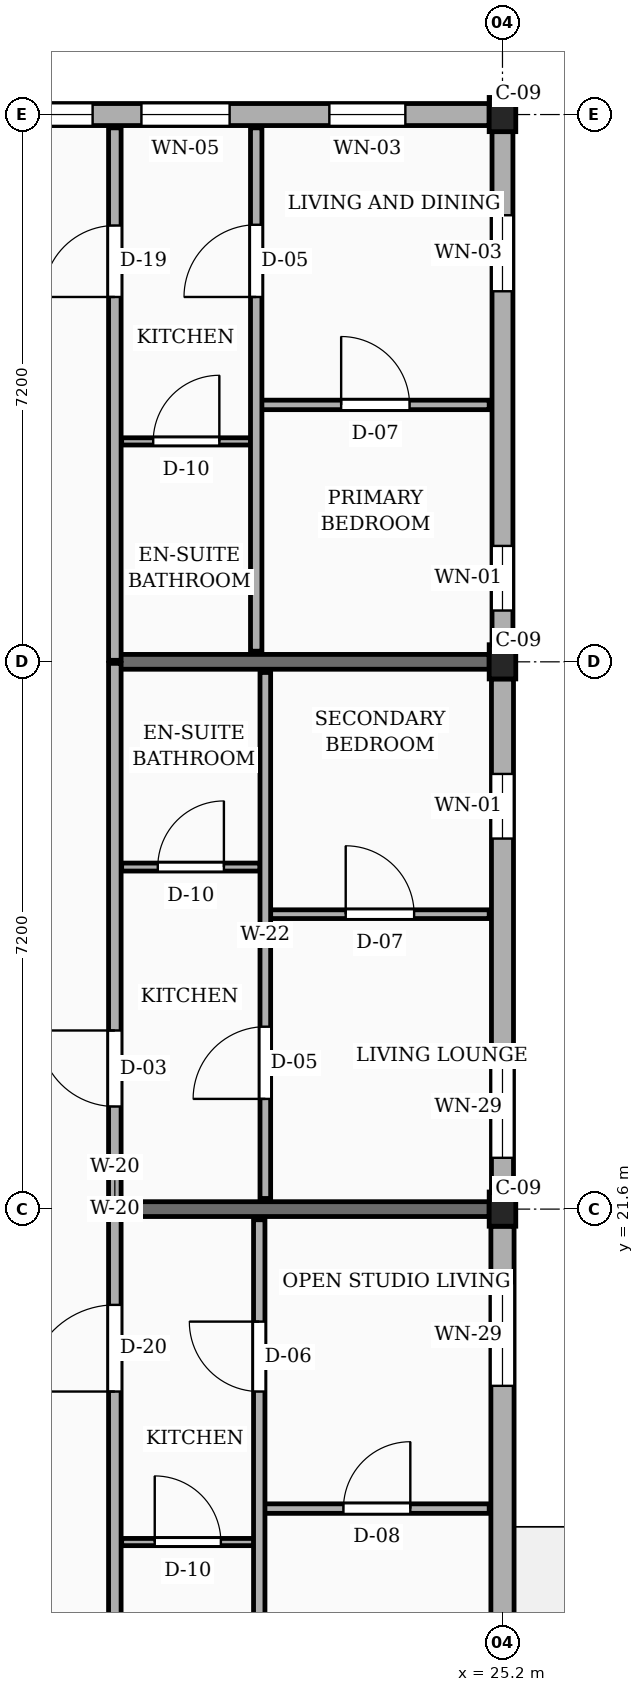
"""IFC4 building model, lengths in metres.
Left out: names, types, materials, properties, quantities, classifications, styles, units other than length and angle.
Written with IfcOpenShell. Run it as: python <this file> out.ifc"""

import sys

from ifc_helpers import new_model, si_unit, direction, frame, frame_2d, origin, origin_2d, place, context, subcontext, project, spatial, rectangle, extrude, element, fill, save


model = new_model("IFC4")
c1 = context("Model", 3, precision=1e-05, world=origin(), true_north=direction((0.0, 1.0)))
c2 = subcontext(c1, "Body", "Model", "MODEL_VIEW")
j1 = project(units=[si_unit("LENGTHUNIT", "METRE"), si_unit("PLANEANGLEUNIT", "RADIAN")], contexts=[c1])
p1 = place(None, origin())
s1 = spatial("IfcSite", under=j1, at=p1, CompositionType="ELEMENT")
p2 = place(p1, origin())
s2 = spatial("IfcBuilding", under=s1, at=p2, CompositionType="ELEMENT")
p3 = place(p2, frame((0.0, 0.0, 48.6)))
s3 = spatial("IfcBuildingStorey", under=s2, at=p3, CompositionType="ELEMENT", Elevation=48.6)
for number, where, z_axis, x_axis in (
    (1, (25.2, 21.6, 0.0), (0.0, 0.0, 1.0), (1.0, 0.0, 0.0)),
    (2, (25.2, 28.8, 0.0), (0.0, 0.0, 1.0), (1.0, 0.0, 0.0)),
    (3, (25.2, 36.0, 0.0), (0.0, 0.0, 1.0), (1.0, 0.0, 0.0)),
):
    element("IfcColumn", number, at=place(p3, frame(where, z_axis=z_axis, x_axis=x_axis)), inside=s3, PredefinedType="COLUMN", context=c2, shape_type="SweptSolid", body=[
        extrude(rectangle(XDim=0.35, YDim=0.45, at=origin_2d()), origin(), (0.0, 0.0, 1.0), 3.15),
    ])
for number, where, z_axis, x_axis in (
    (4, (20.1, 21.6, 0.0), (0.0, 0.0, 1.0), (1.0, 0.0, 0.0)),
    (5, (20.1, 28.8, 0.0), (0.0, 0.0, 1.0), (1.0, 0.0, 0.0)),
):
    element("IfcWall", number, at=place(p3, frame(where, z_axis=z_axis, x_axis=x_axis)), inside=s3, PredefinedType="SOLIDWALL", context=c2, shape_type="SweptSolid", body=[
        extrude(rectangle(XDim=4.925, YDim=0.195, at=frame_2d((2.462, 0.0))), origin(), (0.0, 0.0, 1.0), 2.22),
    ])
p4 = place(p3, frame((25.2, 14.625, 0.0), z_axis=(0.0, 0.0, 1.0), x_axis=(0.0, 1.0, 0.0)))
e6 = element("IfcWall", 6, at=p4, inside=s3, PredefinedType="SOLIDWALL", context=c2, shape_type="SweptSolid", body=[
    extrude(rectangle(XDim=6.75, YDim=0.305, at=frame_2d((3.375, 0.0))), origin(), (0.0, 0.0, 1.0), 2.46),
])
p5 = place(p4, frame((0.45, 0.0, 0.78)))
e7 = element("IfcOpeningElement", 7, at=p5, cuts=e6, PredefinedType="OPENING", context=c2, shape_type="SweptSolid", body=[
    extrude(rectangle(XDim=1.15, YDim=1.44, at=frame_2d((0.575, 0.72))), frame((0.0, 0.163, 0.0), z_axis=(0.0, -1.0, 0.0), x_axis=(1.0, 0.0, 0.0)), (0.0, 0.0, 1.0), 0.325),
])
p6 = place(p4, frame((4.65, 0.0, 0.78)))
e8 = element("IfcOpeningElement", 8, at=p6, cuts=e6, PredefinedType="OPENING", context=c2, shape_type="SweptSolid", body=[
    extrude(rectangle(XDim=1.35, YDim=1.44, at=frame_2d((0.675, 0.72))), frame((0.0, 0.163, 0.0), z_axis=(0.0, -1.0, 0.0), x_axis=(1.0, 0.0, 0.0)), (0.0, 0.0, 1.0), 0.325),
])
p7 = place(p3, frame((25.2, 21.825, 0.0), z_axis=(0.0, 0.0, 1.0), x_axis=(0.0, 1.0, 0.0)))
e9 = element("IfcWall", 9, at=p7, inside=s3, PredefinedType="SOLIDWALL", context=c2, shape_type="SweptSolid", body=[
    extrude(rectangle(XDim=6.75, YDim=0.29, at=frame_2d((3.375, 0.0))), origin(), (0.0, 0.0, 1.0), 2.46),
])
p8 = place(p7, frame((0.45, 0.0, 0.78)))
e10 = element("IfcOpeningElement", 10, at=p8, cuts=e9, PredefinedType="OPENING", context=c2, shape_type="SweptSolid", body=[
    extrude(rectangle(XDim=1.35, YDim=1.44, at=frame_2d((0.675, 0.72))), frame((0.0, 0.155, 0.0), z_axis=(0.0, -1.0, 0.0), x_axis=(1.0, 0.0, 0.0)), (0.0, 0.0, 1.0), 0.31),
])
p9 = place(p7, frame((4.65, 0.0, 0.78)))
e11 = element("IfcOpeningElement", 11, at=p9, cuts=e9, PredefinedType="OPENING", context=c2, shape_type="SweptSolid", body=[
    extrude(rectangle(XDim=0.85, YDim=1.15, at=frame_2d((0.425, 0.575))), frame((0.0, 0.155, 0.0), z_axis=(0.0, -1.0, 0.0), x_axis=(1.0, 0.0, 0.0)), (0.0, 0.0, 1.0), 0.31),
])
p10 = place(p3, frame((25.2, 29.025, 0.0), z_axis=(0.0, 0.0, 1.0), x_axis=(0.0, 1.0, 0.0)))
e12 = element("IfcWall", 12, at=p10, inside=s3, PredefinedType="SOLIDWALL", context=c2, shape_type="SweptSolid", body=[
    extrude(rectangle(XDim=6.75, YDim=0.275, at=frame_2d((3.375, 0.0))), origin(), (0.0, 0.0, 1.0), 2.46),
])
p11 = place(p10, frame((0.45, 0.0, 0.78)))
e13 = element("IfcOpeningElement", 13, at=p11, cuts=e12, PredefinedType="OPENING", context=c2, shape_type="SweptSolid", body=[
    extrude(rectangle(XDim=0.85, YDim=1.15, at=frame_2d((0.425, 0.575))), frame((0.0, 0.147, 0.0), z_axis=(0.0, -1.0, 0.0), x_axis=(1.0, 0.0, 0.0)), (0.0, 0.0, 1.0), 0.295),
])
p12 = place(p10, frame((4.65, 0.0, 0.78)))
e14 = element("IfcOpeningElement", 14, at=p12, cuts=e12, PredefinedType="OPENING", context=c2, shape_type="SweptSolid", body=[
    extrude(rectangle(XDim=1.0, YDim=1.15, at=frame_2d((0.5, 0.575))), frame((0.0, 0.147, 0.0), z_axis=(0.0, -1.0, 0.0), x_axis=(1.0, 0.0, 0.0)), (0.0, 0.0, 1.0), 0.295),
])
p13 = place(p3, frame((25.025, 36.0, 0.0), z_axis=(0.0, 0.0, 1.0), x_axis=(-1.0, 0.0, 0.0)))
e15 = element("IfcWall", 15, at=p13, inside=s3, PredefinedType="SOLIDWALL", context=c2, shape_type="SweptSolid", body=[
    extrude(rectangle(XDim=6.85, YDim=0.29, at=frame_2d((3.425, 0.0))), origin(), (0.0, 0.0, 1.0), 2.46),
])
p14 = place(p13, frame((1.103, 0.0, 0.78)))
e16 = element("IfcOpeningElement", 16, at=p14, cuts=e15, PredefinedType="OPENING", context=c2, shape_type="SweptSolid", body=[
    extrude(rectangle(XDim=1.0, YDim=1.15, at=frame_2d((0.5, 0.575))), frame((0.0, 0.155, 0.0), z_axis=(0.0, -1.0, 0.0), x_axis=(1.0, 0.0, 0.0)), (0.0, 0.0, 1.0), 0.31),
])
p15 = place(p13, frame((3.415, 0.0, 0.78)))
e17 = element("IfcOpeningElement", 17, at=p15, cuts=e15, PredefinedType="OPENING", context=c2, shape_type="SweptSolid", body=[
    extrude(rectangle(XDim=1.16, YDim=1.15, at=frame_2d((0.58, 0.575))), frame((0.0, 0.155, 0.0), z_axis=(0.0, -1.0, 0.0), x_axis=(1.0, 0.0, 0.0)), (0.0, 0.0, 1.0), 0.31),
])
p16 = place(p13, frame((5.218, 0.0, 0.78)))
e18 = element("IfcOpeningElement", 18, at=p16, cuts=e15, PredefinedType="OPENING", context=c2, shape_type="SweptSolid", body=[
    extrude(rectangle(XDim=1.2, YDim=1.26, at=frame_2d((0.6, 0.63))), frame((0.0, 0.155, 0.0), z_axis=(0.0, -1.0, 0.0), x_axis=(1.0, 0.0, 0.0)), (0.0, 0.0, 1.0), 0.31),
])
p17 = place(p3, frame((20.1, 14.42, 0.0), z_axis=(0.0, 0.0, 1.0), x_axis=(0.0, 1.0, 0.0)))
e19 = element("IfcWall", 19, at=p17, inside=s3, PredefinedType="PARTITIONING", context=c2, shape_type="SweptSolid", body=[
    extrude(rectangle(XDim=7.16, YDim=0.165, at=frame_2d((3.58, 0.0))), origin(), (0.0, 0.0, 1.0), 2.325),
])
p18 = place(p17, frame((4.78, 0.0, 0.0)))
e20 = element("IfcOpeningElement", 20, at=p18, cuts=e19, PredefinedType="OPENING", context=c2, shape_type="SweptSolid", body=[
    extrude(rectangle(XDim=1.14, YDim=2.18, at=frame_2d((0.57, 1.09))), frame((0.0, 0.093, 0.0), z_axis=(0.0, -1.0, 0.0), x_axis=(1.0, 0.0, 0.0)), (0.0, 0.0, 1.0), 0.185),
])
p19 = place(p3, frame((20.1, 21.62, 0.0), z_axis=(0.0, 0.0, 1.0), x_axis=(0.0, 1.0, 0.0)))
e21 = element("IfcWall", 21, at=p19, inside=s3, PredefinedType="PARTITIONING", context=c2, shape_type="SweptSolid", body=[
    extrude(rectangle(XDim=7.16, YDim=0.165, at=frame_2d((3.58, 0.0))), origin(), (0.0, 0.0, 1.0), 2.325),
])
p20 = place(p19, frame((1.33, 0.0, 0.0)))
e22 = element("IfcOpeningElement", 22, at=p20, cuts=e21, PredefinedType="OPENING", context=c2, shape_type="SweptSolid", body=[
    extrude(rectangle(XDim=1.0, YDim=2.15, at=frame_2d((0.5, 1.075))), frame((0.0, 0.093, 0.0), z_axis=(0.0, -1.0, 0.0), x_axis=(1.0, 0.0, 0.0)), (0.0, 0.0, 1.0), 0.185),
])
p21 = place(p3, frame((20.1, 28.82, 0.0), z_axis=(0.0, 0.0, 1.0), x_axis=(0.0, 1.0, 0.0)))
e23 = element("IfcWall", 23, at=p21, inside=s3, PredefinedType="PARTITIONING", context=c2, shape_type="SweptSolid", body=[
    extrude(rectangle(XDim=7.005, YDim=0.165, at=frame_2d((3.502, 0.0))), origin(), (0.0, 0.0, 1.0), 2.325),
])
p22 = place(p21, frame((4.78, 0.0, 0.0)))
e24 = element("IfcOpeningElement", 24, at=p22, cuts=e23, PredefinedType="OPENING", context=c2, shape_type="SweptSolid", body=[
    extrude(rectangle(XDim=0.94, YDim=2.12, at=frame_2d((0.47, 1.06))), frame((0.0, 0.093, 0.0), z_axis=(0.0, -1.0, 0.0), x_axis=(1.0, 0.0, 0.0)), (0.0, 0.0, 1.0), 0.185),
])
p23 = place(p3, frame((22.07, 17.66, 0.0), z_axis=(0.0, 0.0, 1.0), x_axis=(1.0, 0.0, 0.0)))
e25 = element("IfcWall", 25, at=p23, inside=s3, PredefinedType="PARTITIONING", context=c2, shape_type="SweptSolid", body=[
    extrude(rectangle(XDim=2.955, YDim=0.125, at=frame_2d((1.478, 0.0))), origin(), (0.0, 0.0, 1.0), 2.325),
])
p24 = place(p23, frame((1.038, 0.0, 0.0)))
e26 = element("IfcOpeningElement", 26, at=p24, cuts=e25, PredefinedType="OPENING", context=c2, shape_type="SweptSolid", body=[
    extrude(rectangle(XDim=0.88, YDim=2.08, at=frame_2d((0.44, 1.04))), frame((0.0, 0.073, 0.0), z_axis=(0.0, -1.0, 0.0), x_axis=(1.0, 0.0, 0.0)), (0.0, 0.0, 1.0), 0.145),
])
p25 = place(p3, frame((20.19, 17.22, 0.0), z_axis=(0.0, 0.0, 1.0), x_axis=(1.0, 0.0, 0.0)))
e27 = element("IfcWall", 27, at=p25, inside=s3, PredefinedType="PARTITIONING", context=c2, shape_type="SweptSolid", body=[
    extrude(rectangle(XDim=1.74, YDim=0.095, at=frame_2d((0.87, 0.0))), origin(), (0.0, 0.0, 1.0), 2.325),
])
p26 = place(p25, frame((0.435, 0.0, 0.0)))
e28 = element("IfcOpeningElement", 28, at=p26, cuts=e27, PredefinedType="OPENING", context=c2, shape_type="SweptSolid", body=[
    extrude(rectangle(XDim=0.87, YDim=2.05, at=frame_2d((0.435, 1.025))), frame((0.0, 0.058, 0.0), z_axis=(0.0, -1.0, 0.0), x_axis=(1.0, 0.0, 0.0)), (0.0, 0.0, 1.0), 0.115),
])
p27 = place(p3, frame((22.0, 14.54, 0.0), z_axis=(0.0, 0.0, 1.0), x_axis=(0.0, 1.0, 0.0)))
e29 = element("IfcWall", 29, at=p27, inside=s3, PredefinedType="PARTITIONING", context=c2, shape_type="SweptSolid", body=[
    extrude(rectangle(XDim=6.92, YDim=0.15, at=frame_2d((3.46, 0.0))), origin(), (0.0, 0.0, 1.0), 2.325),
])
p28 = place(p27, frame((4.66, 0.0, 0.0)))
e30 = element("IfcOpeningElement", 30, at=p28, cuts=e29, PredefinedType="OPENING", context=c2, shape_type="SweptSolid", body=[
    extrude(rectangle(XDim=0.92, YDim=2.1, at=frame_2d((0.46, 1.05))), frame((0.0, 0.085, 0.0), z_axis=(0.0, -1.0, 0.0), x_axis=(1.0, 0.0, 0.0)), (0.0, 0.0, 1.0), 0.17),
])
p29 = place(p3, frame((22.15, 25.48, 0.0), z_axis=(0.0, 0.0, 1.0), x_axis=(1.0, 0.0, 0.0)))
e31 = element("IfcWall", 31, at=p29, inside=s3, PredefinedType="PARTITIONING", context=c2, shape_type="SweptSolid", body=[
    extrude(rectangle(XDim=2.875, YDim=0.115, at=frame_2d((1.438, 0.0))), origin(), (0.0, 0.0, 1.0), 2.325),
])
p30 = place(p29, frame((0.988, 0.0, 0.0)))
e32 = element("IfcOpeningElement", 32, at=p30, cuts=e31, PredefinedType="OPENING", context=c2, shape_type="SweptSolid", body=[
    extrude(rectangle(XDim=0.9, YDim=2.1, at=frame_2d((0.45, 1.05))), frame((0.0, 0.067, 0.0), z_axis=(0.0, -1.0, 0.0), x_axis=(1.0, 0.0, 0.0)), (0.0, 0.0, 1.0), 0.135),
])
p31 = place(p3, frame((20.19, 26.1, 0.0), z_axis=(0.0, 0.0, 1.0), x_axis=(1.0, 0.0, 0.0)))
e33 = element("IfcWall", 33, at=p31, inside=s3, PredefinedType="PARTITIONING", context=c2, shape_type="SweptSolid", body=[
    extrude(rectangle(XDim=1.82, YDim=0.105, at=frame_2d((0.91, 0.0))), origin(), (0.0, 0.0, 1.0), 2.325),
])
p32 = place(p31, frame((0.475, 0.0, 0.0)))
e34 = element("IfcOpeningElement", 34, at=p32, cuts=e33, PredefinedType="OPENING", context=c2, shape_type="SweptSolid", body=[
    extrude(rectangle(XDim=0.87, YDim=2.05, at=frame_2d((0.435, 1.025))), frame((0.0, 0.062, 0.0), z_axis=(0.0, -1.0, 0.0), x_axis=(1.0, 0.0, 0.0)), (0.0, 0.0, 1.0), 0.125),
])
p33 = place(p3, frame((22.08, 21.74, 0.0), z_axis=(0.0, 0.0, 1.0), x_axis=(0.0, 1.0, 0.0)))
e35 = element("IfcWall", 35, at=p33, inside=s3, PredefinedType="PARTITIONING", context=c2, shape_type="SweptSolid", body=[
    extrude(rectangle(XDim=6.92, YDim=0.14, at=frame_2d((3.46, 0.0))), origin(), (0.0, 0.0, 1.0), 2.325),
])
p34 = place(p33, frame((1.31, 0.0, 0.0)))
e36 = element("IfcOpeningElement", 36, at=p34, cuts=e35, PredefinedType="OPENING", context=c2, shape_type="SweptSolid", body=[
    extrude(rectangle(XDim=0.95, YDim=2.1, at=frame_2d((0.475, 1.05))), frame((0.0, 0.08, 0.0), z_axis=(0.0, -1.0, 0.0), x_axis=(1.0, 0.0, 0.0)), (0.0, 0.0, 1.0), 0.16),
])
p35 = place(p3, frame((22.03, 32.18, 0.0), z_axis=(0.0, 0.0, 1.0), x_axis=(1.0, 0.0, 0.0)))
e37 = element("IfcWall", 37, at=p35, inside=s3, PredefinedType="PARTITIONING", context=c2, shape_type="SweptSolid", body=[
    extrude(rectangle(XDim=2.995, YDim=0.125, at=frame_2d((1.498, 0.0))), origin(), (0.0, 0.0, 1.0), 2.325),
])
p36 = place(p35, frame((1.048, 0.0, 0.0)))
e38 = element("IfcOpeningElement", 38, at=p36, cuts=e37, PredefinedType="OPENING", context=c2, shape_type="SweptSolid", body=[
    extrude(rectangle(XDim=0.9, YDim=2.1, at=frame_2d((0.45, 1.05))), frame((0.0, 0.073, 0.0), z_axis=(0.0, -1.0, 0.0), x_axis=(1.0, 0.0, 0.0)), (0.0, 0.0, 1.0), 0.145),
])
p37 = place(p3, frame((20.19, 31.7, 0.0), z_axis=(0.0, 0.0, 1.0), x_axis=(1.0, 0.0, 0.0)))
e39 = element("IfcWall", 39, at=p37, inside=s3, PredefinedType="PARTITIONING", context=c2, shape_type="SweptSolid", body=[
    extrude(rectangle(XDim=1.7, YDim=0.095, at=frame_2d((0.85, 0.0))), origin(), (0.0, 0.0, 1.0), 2.325),
])
p38 = place(p37, frame((0.415, 0.0, 0.0)))
e40 = element("IfcOpeningElement", 40, at=p38, cuts=e39, PredefinedType="OPENING", context=c2, shape_type="SweptSolid", body=[
    extrude(rectangle(XDim=0.87, YDim=2.05, at=frame_2d((0.435, 1.025))), frame((0.0, 0.058, 0.0), z_axis=(0.0, -1.0, 0.0), x_axis=(1.0, 0.0, 0.0)), (0.0, 0.0, 1.0), 0.115),
])
p39 = place(p3, frame((21.96, 28.94, 0.0), z_axis=(0.0, 0.0, 1.0), x_axis=(0.0, 1.0, 0.0)))
e41 = element("IfcWall", 41, at=p39, inside=s3, PredefinedType="PARTITIONING", context=c2, shape_type="SweptSolid", body=[
    extrude(rectangle(XDim=6.885, YDim=0.15, at=frame_2d((3.442, 0.0))), origin(), (0.0, 0.0, 1.0), 2.325),
])
p40 = place(p39, frame((4.66, 0.0, 0.0)))
e42 = element("IfcOpeningElement", 42, at=p40, cuts=e41, PredefinedType="OPENING", context=c2, shape_type="SweptSolid", body=[
    extrude(rectangle(XDim=0.95, YDim=2.1, at=frame_2d((0.475, 1.05))), frame((0.0, 0.085, 0.0), z_axis=(0.0, -1.0, 0.0), x_axis=(1.0, 0.0, 0.0)), (0.0, 0.0, 1.0), 0.17),
])
p41 = place(p6, origin())
e43 = element("IfcWindow", 43, at=p41, inside=s3, PartitioningType="SINGLE_PANEL", PredefinedType="WINDOW", context=c2, shape_type="SweptSolid", body=[
    extrude(rectangle(XDim=1.35, YDim=1.44, at=frame_2d((0.675, 0.72))), frame((0.0, 0.03, 0.0), z_axis=(0.0, -1.0, 0.0), x_axis=(1.0, 0.0, 0.0)), (0.0, 0.0, 1.0), 0.06),
])
fill(e8, e43)
p42 = place(p8, origin())
e44 = element("IfcWindow", 44, at=p42, inside=s3, PartitioningType="SINGLE_PANEL", PredefinedType="WINDOW", context=c2, shape_type="SweptSolid", body=[
    extrude(rectangle(XDim=1.35, YDim=1.44, at=frame_2d((0.675, 0.72))), frame((0.0, 0.03, 0.0), z_axis=(0.0, -1.0, 0.0), x_axis=(1.0, 0.0, 0.0)), (0.0, 0.0, 1.0), 0.06),
])
fill(e10, e44)
p43 = place(p9, origin())
e45 = element("IfcWindow", 45, at=p43, inside=s3, PartitioningType="SINGLE_PANEL", PredefinedType="WINDOW", context=c2, shape_type="SweptSolid", body=[
    extrude(rectangle(XDim=0.85, YDim=1.15, at=frame_2d((0.425, 0.575))), frame((0.0, 0.03, 0.0), z_axis=(0.0, -1.0, 0.0), x_axis=(1.0, 0.0, 0.0)), (0.0, 0.0, 1.0), 0.06),
])
fill(e11, e45)
p44 = place(p11, origin())
e46 = element("IfcWindow", 46, at=p44, inside=s3, PartitioningType="SINGLE_PANEL", PredefinedType="WINDOW", context=c2, shape_type="SweptSolid", body=[
    extrude(rectangle(XDim=0.85, YDim=1.15, at=frame_2d((0.425, 0.575))), frame((0.0, 0.03, 0.0), z_axis=(0.0, -1.0, 0.0), x_axis=(1.0, 0.0, 0.0)), (0.0, 0.0, 1.0), 0.06),
])
fill(e13, e46)
p45 = place(p12, origin())
e47 = element("IfcWindow", 47, at=p45, inside=s3, PartitioningType="SINGLE_PANEL", PredefinedType="WINDOW", context=c2, shape_type="SweptSolid", body=[
    extrude(rectangle(XDim=1.0, YDim=1.15, at=frame_2d((0.5, 0.575))), frame((0.0, 0.03, 0.0), z_axis=(0.0, -1.0, 0.0), x_axis=(1.0, 0.0, 0.0)), (0.0, 0.0, 1.0), 0.06),
])
fill(e14, e47)
p46 = place(p14, origin())
e48 = element("IfcWindow", 48, at=p46, inside=s3, PartitioningType="SINGLE_PANEL", PredefinedType="WINDOW", context=c2, shape_type="SweptSolid", body=[
    extrude(rectangle(XDim=1.0, YDim=1.15, at=frame_2d((0.5, 0.575))), frame((0.0, 0.03, 0.0), z_axis=(0.0, -1.0, 0.0), x_axis=(1.0, 0.0, 0.0)), (0.0, 0.0, 1.0), 0.06),
])
fill(e16, e48)
p47 = place(p15, origin())
e49 = element("IfcWindow", 49, at=p47, inside=s3, PartitioningType="SINGLE_PANEL", PredefinedType="WINDOW", context=c2, shape_type="SweptSolid", body=[
    extrude(rectangle(XDim=1.16, YDim=1.15, at=frame_2d((0.58, 0.575))), frame((0.0, 0.03, 0.0), z_axis=(0.0, -1.0, 0.0), x_axis=(1.0, 0.0, 0.0)), (0.0, 0.0, 1.0), 0.06),
])
fill(e17, e49)
p48 = place(p16, origin())
e50 = element("IfcWindow", 50, at=p48, inside=s3, PartitioningType="SINGLE_PANEL", PredefinedType="WINDOW", context=c2, shape_type="SweptSolid", body=[
    extrude(rectangle(XDim=1.2, YDim=1.26, at=frame_2d((0.6, 0.63))), frame((0.0, 0.03, 0.0), z_axis=(0.0, -1.0, 0.0), x_axis=(1.0, 0.0, 0.0)), (0.0, 0.0, 1.0), 0.06),
])
fill(e18, e50)
p49 = place(p18, origin())
e51 = element("IfcDoor", 51, at=p49, inside=s3, OperationType="SINGLE_SWING_LEFT", PredefinedType="DOOR", context=c2, shape_type="SweptSolid", body=[
    extrude(rectangle(XDim=1.14, YDim=2.18, at=frame_2d((0.57, 1.09))), frame((0.0, 0.025, 0.0), z_axis=(0.0, -1.0, 0.0), x_axis=(1.0, 0.0, 0.0)), (0.0, 0.0, 1.0), 0.05),
])
fill(e20, e51)
p50 = place(p20, origin())
e52 = element("IfcDoor", 52, at=p50, inside=s3, OperationType="SINGLE_SWING_RIGHT", PredefinedType="DOOR", context=c2, shape_type="SweptSolid", body=[
    extrude(rectangle(XDim=1.0, YDim=2.15, at=frame_2d((0.5, 1.075))), frame((0.0, 0.025, 0.0), z_axis=(0.0, -1.0, 0.0), x_axis=(1.0, 0.0, 0.0)), (0.0, 0.0, 1.0), 0.05),
])
fill(e22, e52)
p51 = place(p22, origin())
e53 = element("IfcDoor", 53, at=p51, inside=s3, OperationType="SINGLE_SWING_LEFT", PredefinedType="DOOR", context=c2, shape_type="SweptSolid", body=[
    extrude(rectangle(XDim=0.94, YDim=2.12, at=frame_2d((0.47, 1.06))), frame((0.0, 0.025, 0.0), z_axis=(0.0, -1.0, 0.0), x_axis=(1.0, 0.0, 0.0)), (0.0, 0.0, 1.0), 0.05),
])
fill(e24, e53)
p52 = place(p24, origin())
e54 = element("IfcDoor", 54, at=p52, inside=s3, OperationType="SINGLE_SWING_RIGHT", PredefinedType="DOOR", context=c2, shape_type="SweptSolid", body=[
    extrude(rectangle(XDim=0.88, YDim=2.08, at=frame_2d((0.44, 1.04))), frame((0.0, 0.025, 0.0), z_axis=(0.0, -1.0, 0.0), x_axis=(1.0, 0.0, 0.0)), (0.0, 0.0, 1.0), 0.05),
])
fill(e26, e54)
p53 = place(p26, origin())
e55 = element("IfcDoor", 55, at=p53, inside=s3, OperationType="SINGLE_SWING_LEFT", PredefinedType="DOOR", context=c2, shape_type="SweptSolid", body=[
    extrude(rectangle(XDim=0.87, YDim=2.05, at=frame_2d((0.435, 1.025))), frame((0.0, 0.025, 0.0), z_axis=(0.0, -1.0, 0.0), x_axis=(1.0, 0.0, 0.0)), (0.0, 0.0, 1.0), 0.05),
])
fill(e28, e55)
p54 = place(p28, origin())
e56 = element("IfcDoor", 56, at=p54, inside=s3, OperationType="SINGLE_SWING_RIGHT", PredefinedType="DOOR", context=c2, shape_type="SweptSolid", body=[
    extrude(rectangle(XDim=0.92, YDim=2.1, at=frame_2d((0.46, 1.05))), frame((0.0, 0.025, 0.0), z_axis=(0.0, -1.0, 0.0), x_axis=(1.0, 0.0, 0.0)), (0.0, 0.0, 1.0), 0.05),
])
fill(e30, e56)
p55 = place(p30, origin())
e57 = element("IfcDoor", 57, at=p55, inside=s3, OperationType="SINGLE_SWING_LEFT", PredefinedType="DOOR", context=c2, shape_type="SweptSolid", body=[
    extrude(rectangle(XDim=0.9, YDim=2.1, at=frame_2d((0.45, 1.05))), frame((0.0, 0.025, 0.0), z_axis=(0.0, -1.0, 0.0), x_axis=(1.0, 0.0, 0.0)), (0.0, 0.0, 1.0), 0.05),
])
fill(e32, e57)
p56 = place(p32, origin())
e58 = element("IfcDoor", 58, at=p56, inside=s3, OperationType="SINGLE_SWING_RIGHT", PredefinedType="DOOR", context=c2, shape_type="SweptSolid", body=[
    extrude(rectangle(XDim=0.87, YDim=2.05, at=frame_2d((0.435, 1.025))), frame((0.0, 0.025, 0.0), z_axis=(0.0, -1.0, 0.0), x_axis=(1.0, 0.0, 0.0)), (0.0, 0.0, 1.0), 0.05),
])
fill(e34, e58)
p57 = place(p34, origin())
e59 = element("IfcDoor", 59, at=p57, inside=s3, OperationType="SINGLE_SWING_LEFT", PredefinedType="DOOR", context=c2, shape_type="SweptSolid", body=[
    extrude(rectangle(XDim=0.95, YDim=2.1, at=frame_2d((0.475, 1.05))), frame((0.0, 0.025, 0.0), z_axis=(0.0, -1.0, 0.0), x_axis=(1.0, 0.0, 0.0)), (0.0, 0.0, 1.0), 0.05),
])
fill(e36, e59)
p58 = place(p36, origin())
e60 = element("IfcDoor", 60, at=p58, inside=s3, OperationType="SINGLE_SWING_LEFT", PredefinedType="DOOR", context=c2, shape_type="SweptSolid", body=[
    extrude(rectangle(XDim=0.9, YDim=2.1, at=frame_2d((0.45, 1.05))), frame((0.0, 0.025, 0.0), z_axis=(0.0, -1.0, 0.0), x_axis=(1.0, 0.0, 0.0)), (0.0, 0.0, 1.0), 0.05),
])
fill(e38, e60)
p59 = place(p38, origin())
e61 = element("IfcDoor", 61, at=p59, inside=s3, OperationType="SINGLE_SWING_RIGHT", PredefinedType="DOOR", context=c2, shape_type="SweptSolid", body=[
    extrude(rectangle(XDim=0.87, YDim=2.05, at=frame_2d((0.435, 1.025))), frame((0.0, 0.025, 0.0), z_axis=(0.0, -1.0, 0.0), x_axis=(1.0, 0.0, 0.0)), (0.0, 0.0, 1.0), 0.05),
])
fill(e40, e61)
p60 = place(p40, origin())
e62 = element("IfcDoor", 62, at=p60, inside=s3, OperationType="SINGLE_SWING_LEFT", PredefinedType="DOOR", context=c2, shape_type="SweptSolid", body=[
    extrude(rectangle(XDim=0.95, YDim=2.1, at=frame_2d((0.475, 1.05))), frame((0.0, 0.025, 0.0), z_axis=(0.0, -1.0, 0.0), x_axis=(1.0, 0.0, 0.0)), (0.0, 0.0, 1.0), 0.05),
])
fill(e42, e62)
save(model, sys.argv[1])
